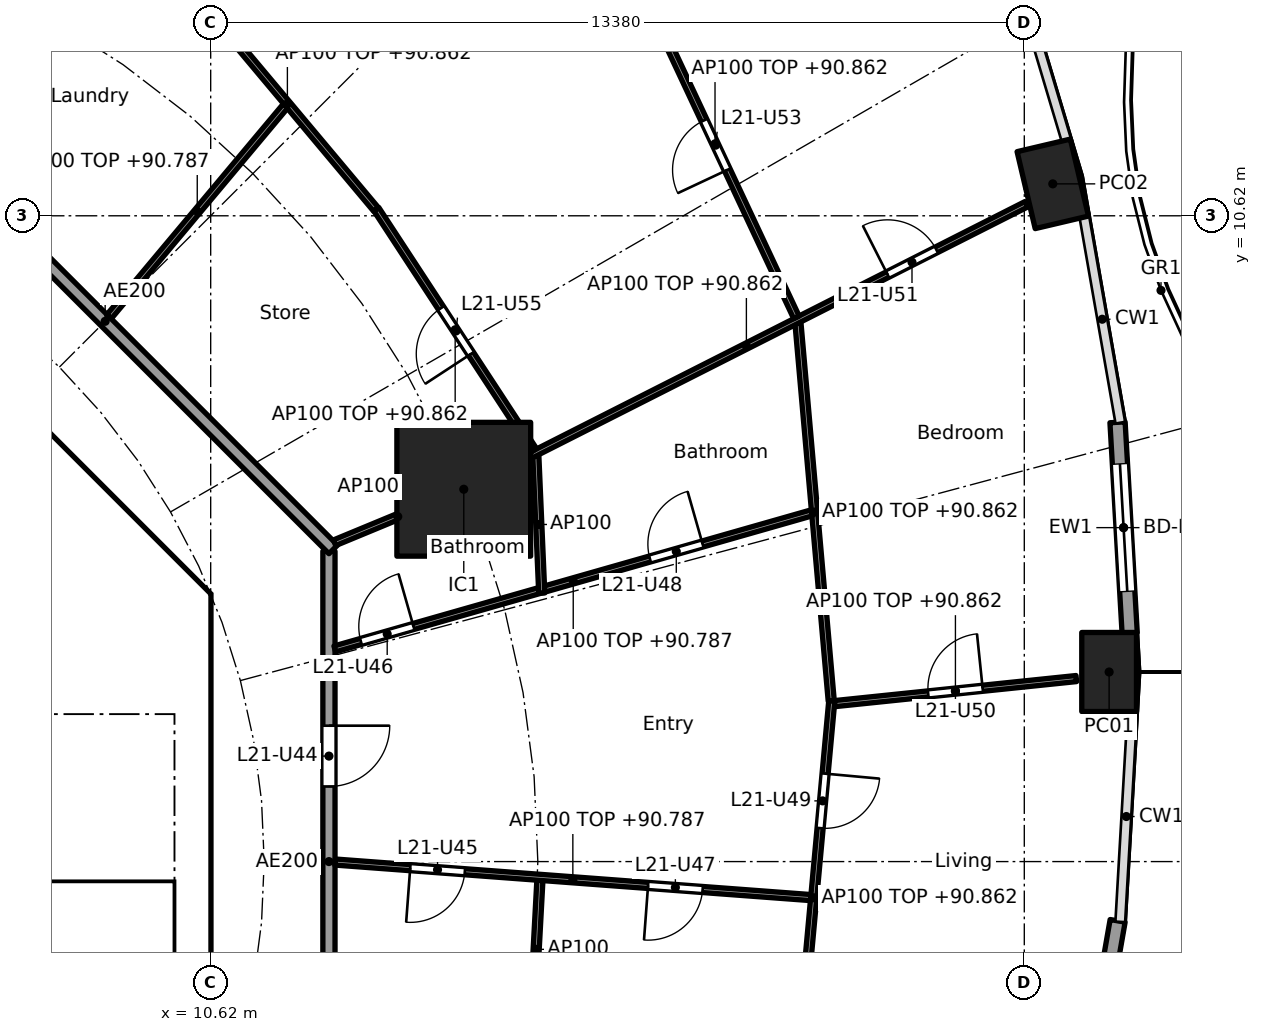
"""IFC4 building model, lengths in metres.
Left out: names, types, materials, properties, quantities, classifications, styles, units other than length and angle.
Written with IfcOpenShell. Run it as: python <this file> out.ifc"""

import sys

from ifc_helpers import new_model, si_unit, direction, frame, frame_2d, origin, origin_2d, place, context, subcontext, project, spatial, polyline, rectangle, hollow_rectangle, outline, extrude, element, fill, save


model = new_model("IFC4")
c1 = context("Model", 3, precision=1e-05, world=origin(), true_north=direction((0.0, 1.0)))
c2 = subcontext(c1, "Body", "Model", "MODEL_VIEW")
j1 = project(units=[si_unit("LENGTHUNIT", "METRE"), si_unit("PLANEANGLEUNIT", "RADIAN")], contexts=[c1])
p1 = place(None, origin())
s1 = spatial("IfcSite", under=j1, at=p1, CompositionType="ELEMENT")
p2 = place(p1, origin())
s2 = spatial("IfcBuilding", under=s1, at=p2, CompositionType="ELEMENT")
p3 = place(p2, frame((0.0, 0.0, 88.1)))
s3 = spatial("IfcBuildingStorey", under=s2, at=p3, CompositionType="ELEMENT", Elevation=88.1)
for number, where, z_axis, x_axis in (
    (1, (25.395, 3.118, 0.0), (0.0, 0.0, 1.0), (0.0, 1.0, 0.0)),
    (2, (24.468, 11.145, 0.0), (0.0, 0.0, 1.0), (-0.229, 0.973, 0.0)),
):
    element("IfcColumn", number, at=place(p3, frame(where, z_axis=z_axis, x_axis=x_axis)), inside=s3, PredefinedType="COLUMN", context=c2, shape_type="SweptSolid", body=[
        extrude(hollow_rectangle(XDim=1.3, YDim=0.9, WallThickness=0.045, at=origin_2d()), origin(), (0.0, 0.0, 1.0), 3.7),
    ])
p4 = place(p3, frame((14.782, 6.123, 0.0), z_axis=(0.0, 0.0, 1.0), x_axis=(1.0, 0.0, 0.0)))
e3 = element("IfcColumn", 3, at=p4, inside=s3, PredefinedType="COLUMN", context=c2, shape_type="SweptSolid", body=[
    extrude(rectangle(XDim=2.2, YDim=2.2, at=origin_2d()), origin(), (0.0, 0.0, 1.0), 3.7),
])
p5 = place(p3, frame((25.533, 7.224, 0.0), z_axis=(0.0, 0.0, 1.0), x_axis=(0.057546644052, -0.998342818754, 0.0)))
e4 = element("IfcWall", 4, at=p5, inside=s3, PredefinedType="SOLIDWALL", context=c2, shape_type="SweptSolid", body=[
    extrude(rectangle(XDim=3.47, YDim=0.25, at=frame_2d((1.735, 0.0))), origin(), (0.0, 0.0, 1.0), 3.44),
])
p6 = place(p5, frame((0.685, 0.0, 0.0)))
e5 = element("IfcOpeningElement", 5, at=p6, cuts=e4, PredefinedType="OPENING", context=c2, shape_type="SweptSolid", body=[
    extrude(rectangle(XDim=2.1, YDim=2.4, at=frame_2d((1.05, 1.2))), frame((0.0, 0.135, 0.0), z_axis=(0.0, -1.0, 0.0), x_axis=(1.0, 0.0, 0.0)), (0.0, 0.0, 1.0), 0.27),
])
p7 = place(p3, frame((25.535, -0.974, 0.0), z_axis=(0.0, 0.0, 1.0), x_axis=(-0.172164316671, -0.985068245385, 0.0)))
e6 = element("IfcWall", 6, at=p7, inside=s3, PredefinedType="SOLIDWALL", context=c2, shape_type="SweptSolid", body=[
    extrude(rectangle(XDim=3.454, YDim=0.25, at=frame_2d((1.727, 0.0))), origin(), (0.0, 0.0, 1.0), 3.44),
])
p8 = place(p7, frame((0.677, 0.0, 0.0)))
e7 = element("IfcOpeningElement", 7, at=p8, cuts=e6, PredefinedType="OPENING", context=c2, shape_type="SweptSolid", body=[
    extrude(rectangle(XDim=2.1, YDim=2.4, at=frame_2d((1.05, 1.2))), frame((0.0, 0.135, 0.0), z_axis=(0.0, -1.0, 0.0), x_axis=(1.0, 0.0, 0.0)), (0.0, 0.0, 1.0), 0.27),
])
p9 = place(p3, frame((9.988, 4.613, 0.0), z_axis=(0.0, 0.0, 1.0), x_axis=(-0.707106781187, 0.707106781187, 0.0)))
e8 = element("IfcWall", 8, at=p9, inside=s3, PredefinedType="SHEAR", context=c2, shape_type="SweptSolid", body=[
    extrude(rectangle(XDim=7.602, YDim=0.6, at=frame_2d((3.801, 0.0))), origin(), (0.0, 0.0, 1.0), 3.44),
])
p10 = place(p9, frame((3.201, 0.0, 0.0)))
e9 = element("IfcOpeningElement", 9, at=p10, cuts=e8, PredefinedType="OPENING", context=c2, shape_type="SweptSolid", body=[
    extrude(rectangle(XDim=1.2, YDim=2.1, at=frame_2d((0.6, 1.05))), frame((0.0, 0.31, 0.0), z_axis=(0.0, -1.0, 0.0), x_axis=(1.0, 0.0, 0.0)), (0.0, 0.0, 1.0), 0.62),
])
p11 = place(p3, frame((6.7, 4.0, 0.0), z_axis=(0.0, 0.0, 1.0), x_axis=(1.0, 0.0, 0.0)))
e10 = element("IfcWall", 10, at=p11, inside=s3, PredefinedType="SOLIDWALL", context=c2, shape_type="SweptSolid", body=[
    extrude(rectangle(XDim=3.325, YDim=0.2, at=frame_2d((1.662, 0.0))), origin(), (0.0, 0.0, 1.0), 3.44),
])
p12 = place(p11, frame((1.25, 0.0, 0.0)))
e11 = element("IfcOpeningElement", 11, at=p12, cuts=e10, PredefinedType="OPENING", context=c2, shape_type="SweptSolid", body=[
    extrude(rectangle(XDim=1.1, YDim=2.1, at=frame_2d((0.55, 1.05))), frame((0.0, 0.11, 0.0), z_axis=(0.0, -1.0, 0.0), x_axis=(1.0, 0.0, 0.0)), (0.0, 0.0, 1.0), 0.22),
])
p13 = place(p3, origin())
e12 = element("IfcWall", 12, at=p13, inside=s3, PredefinedType="SHEAR", context=c2, shape_type="SweptSolid", body=[
    extrude(outline(polyline([(9.776, -4.401), (10.025, -4.152), (10.025, -3.801), (10.025, 4.152), (9.776, 4.401), (10.2, 4.825), (10.625, 4.401), (10.625, -4.401), (10.2, -4.825), (9.776, -4.401)])), origin(), (0.0, 0.0, 1.0), 3.44),
])
p14 = place(p3, frame((12.565, -5.104, 0.0), z_axis=(0.0, 0.0, 1.0), x_axis=(0.0, 1.0, 0.0)))
e13 = element("IfcWall", 13, at=p14, inside=s3, PredefinedType="PARTITIONING", context=c2, shape_type="SweptSolid", body=[
    extrude(rectangle(XDim=10.209, YDim=0.2, at=frame_2d((5.104, 0.0))), origin(), (0.0, 0.0, 1.0), 3.44),
])
p15 = place(p14, frame((6.339, 0.0, 0.0)))
e14 = element("IfcOpeningElement", 14, at=p15, cuts=e13, PredefinedType="OPENING", context=c2, shape_type="SweptSolid", body=[
    extrude(rectangle(XDim=1.0, YDim=2.1, at=frame_2d((0.5, 1.05))), frame((0.0, 0.11, 0.0), z_axis=(0.0, -1.0, 0.0), x_axis=(1.0, 0.0, 0.0)), (0.0, 0.0, 1.0), 0.22),
])
p16 = place(p3, frame((12.635, 5.134, 0.0), z_axis=(0.0, 0.0, 1.0), x_axis=(-0.707106781187, 0.707106781187, 0.0)))
e15 = element("IfcWall", 15, at=p16, inside=s3, PredefinedType="PARTITIONING", context=c2, shape_type="SweptSolid", body=[
    extrude(rectangle(XDim=10.609, YDim=0.2, at=frame_2d((5.305, 0.0))), origin(), (0.0, 0.0, 1.0), 3.44),
])
p17 = place(p3, frame((20.879, 2.597, 0.0), z_axis=(0.0, 0.0, 1.0), x_axis=(0.994666546694, 0.103142914868, 0.0)))
e16 = element("IfcWall", 16, at=p17, inside=s3, PredefinedType="PARTITIONING", context=c2, shape_type="SweptSolid", body=[
    extrude(rectangle(XDim=3.998, YDim=0.1, at=frame_2d((1.999, 0.0))), origin(), (0.0, 0.0, 1.0), 2.762),
])
p18 = place(p17, frame((1.549, 0.0, 0.0)))
e17 = element("IfcOpeningElement", 17, at=p18, cuts=e16, PredefinedType="OPENING", context=c2, shape_type="SweptSolid", body=[
    extrude(rectangle(XDim=0.9, YDim=2.1, at=frame_2d((0.45, 1.05))), frame((0.0, 0.06, 0.0), z_axis=(0.0, -1.0, 0.0), x_axis=(1.0, 0.0, 0.0)), (0.0, 0.0, 1.0), 0.12),
])
p19 = place(p3, frame((20.825, 2.642, 0.0), z_axis=(0.0, 0.0, 1.0), x_axis=(-0.08776129045, 0.99614153407, 0.0)))
e18 = element("IfcWall", 18, at=p19, inside=s3, PredefinedType="PARTITIONING", context=c2, shape_type="SweptSolid", body=[
    extrude(rectangle(XDim=6.237, YDim=0.1, at=frame_2d((3.119, 0.0))), origin(), (0.0, 0.0, 1.0), 2.762),
])
p20 = place(p3, frame((20.834, 2.642, 0.0), z_axis=(0.0, 0.0, 1.0), x_axis=(-0.091385407685, -0.995815599025, 0.0)))
e19 = element("IfcWall", 19, at=p20, inside=s3, PredefinedType="PARTITIONING", context=c2, shape_type="SweptSolid", body=[
    extrude(rectangle(XDim=6.502, YDim=0.1, at=frame_2d((3.251, 0.0))), origin(), (0.0, 0.0, 1.0), 2.762),
])
p21 = place(p20, frame((1.201, 0.0, 0.0)))
e20 = element("IfcOpeningElement", 20, at=p21, cuts=e19, PredefinedType="OPENING", context=c2, shape_type="SweptSolid", body=[
    extrude(rectangle(XDim=0.9, YDim=2.1, at=frame_2d((0.45, 1.05))), frame((0.0, 0.06, 0.0), z_axis=(0.0, -1.0, 0.0), x_axis=(1.0, 0.0, 0.0)), (0.0, 0.0, 1.0), 0.12),
])
p22 = place(p3, frame((12.661, 3.497, 0.0), z_axis=(0.0, 0.0, 1.0), x_axis=(0.961626678623, 0.274361314621, 0.0)))
e21 = element("IfcWall", 21, at=p22, inside=s3, PredefinedType="PARTITIONING", context=c2, shape_type="SweptSolid", body=[
    extrude(rectangle(XDim=8.156, YDim=0.1, at=frame_2d((4.078, 0.0))), origin(), (0.0, 0.0, 1.0), 2.687),
])
p23 = place(p22, frame((0.446, 0.0, 0.0)))
e22 = element("IfcOpeningElement", 22, at=p23, cuts=e21, PredefinedType="OPENING", context=c2, shape_type="SweptSolid", body=[
    extrude(rectangle(XDim=0.9, YDim=2.1, at=frame_2d((0.45, 1.05))), frame((0.0, 0.06, 0.0), z_axis=(0.0, -1.0, 0.0), x_axis=(1.0, 0.0, 0.0)), (0.0, 0.0, 1.0), 0.12),
])
p24 = place(p22, frame((5.39, 0.0, 0.0)))
e23 = element("IfcOpeningElement", 23, at=p24, cuts=e21, PredefinedType="OPENING", context=c2, shape_type="SweptSolid", body=[
    extrude(rectangle(XDim=0.9, YDim=2.1, at=frame_2d((0.45, 1.05))), frame((0.0, 0.06, 0.0), z_axis=(0.0, -1.0, 0.0), x_axis=(1.0, 0.0, 0.0)), (0.0, 0.0, 1.0), 0.12),
])
p25 = place(p3, frame((16.064, 4.415, 0.0), z_axis=(0.0, 0.0, 1.0), x_axis=(-0.043118325477, 0.999069972528, 0.0)))
e24 = element("IfcWall", 24, at=p25, inside=s3, PredefinedType="PARTITIONING", context=c2, shape_type="SweptSolid", body=[
    extrude(rectangle(XDim=2.259, YDim=0.1, at=frame_2d((1.13, 0.0))), origin(), (0.0, 0.0, 1.0), 3.44),
])
p26 = place(p3, frame((12.657, 5.243, 0.0), z_axis=(0.0, 0.0, 1.0), x_axis=(0.923848837015, 0.382757529444, 0.0)))
e25 = element("IfcWall", 25, at=p26, inside=s3, PredefinedType="PARTITIONING", context=c2, shape_type="SweptSolid", body=[
    extrude(rectangle(XDim=2.25, YDim=0.1, at=frame_2d((1.125, 0.0))), origin(), (0.0, 0.0, 1.0), 3.44),
])
p27 = place(p3, frame((14.827, 6.146, 0.0), z_axis=(0.0, 0.0, 1.0), x_axis=(0.892068075337, 0.451901038906, 0.0)))
e26 = element("IfcWall", 26, at=p27, inside=s3, PredefinedType="PARTITIONING", context=c2, shape_type="SweptSolid", body=[
    extrude(rectangle(XDim=10.32, YDim=0.1, at=frame_2d((5.16, 0.0))), origin(), (0.0, 0.0, 1.0), 2.762),
])
p28 = place(p27, frame((7.763, 0.0, 0.0)))
e27 = element("IfcOpeningElement", 27, at=p28, cuts=e26, PredefinedType="OPENING", context=c2, shape_type="SweptSolid", body=[
    extrude(rectangle(XDim=0.9, YDim=2.1, at=frame_2d((0.45, 1.05))), frame((0.0, 0.06, 0.0), z_axis=(0.0, -1.0, 0.0), x_axis=(1.0, 0.0, 0.0)), (0.0, 0.0, 1.0), 0.12),
])
p29 = place(p3, frame((15.938, 6.764, 0.0), z_axis=(0.0, 0.0, 1.0), x_axis=(-0.547472878942, 0.836823426311, 0.0)))
e28 = element("IfcWall", 28, at=p29, inside=s3, PredefinedType="PARTITIONING", context=c2, shape_type="SweptSolid", body=[
    extrude(rectangle(XDim=4.738, YDim=0.1, at=frame_2d((2.369, 0.0))), origin(), (0.0, 0.0, 1.0), 2.762),
])
p30 = place(p29, frame((1.894, 0.0, 0.0)))
e29 = element("IfcOpeningElement", 29, at=p30, cuts=e28, PredefinedType="OPENING", context=c2, shape_type="SweptSolid", body=[
    extrude(rectangle(XDim=0.9, YDim=2.1, at=frame_2d((0.45, 1.05))), frame((0.0, 0.06, 0.0), z_axis=(0.0, -1.0, 0.0), x_axis=(1.0, 0.0, 0.0)), (0.0, 0.0, 1.0), 0.12),
])
p31 = place(p3, frame((20.252, 8.95, 0.0), z_axis=(0.0, 0.0, 1.0), x_axis=(-0.424580709335, 0.905390093419, 0.0)))
e30 = element("IfcWall", 30, at=p31, inside=s3, PredefinedType="PARTITIONING", context=c2, shape_type="SweptSolid", body=[
    extrude(rectangle(XDim=6.304, YDim=0.1, at=frame_2d((3.152, 0.0))), origin(), (0.0, 0.0, 1.0), 2.762),
])
p32 = place(p31, frame((2.677, 0.0, 0.0)))
e31 = element("IfcOpeningElement", 31, at=p32, cuts=e30, PredefinedType="OPENING", context=c2, shape_type="SweptSolid", body=[
    extrude(rectangle(XDim=0.9, YDim=2.1, at=frame_2d((0.45, 1.05))), frame((0.0, 0.06, 0.0), z_axis=(0.0, -1.0, 0.0), x_axis=(1.0, 0.0, 0.0)), (0.0, 0.0, 1.0), 0.12),
])
p33 = place(p3, frame((13.339, 10.725, 0.0), z_axis=(0.0, 0.0, 1.0), x_axis=(-0.642515455924, 0.766272724882, 0.0)))
e32 = element("IfcWall", 32, at=p33, inside=s3, PredefinedType="PARTITIONING", context=c2, shape_type="SweptSolid", body=[
    extrude(rectangle(XDim=4.537, YDim=0.1, at=frame_2d((2.269, 0.0))), origin(), (0.0, 0.0, 1.0), 2.762),
])
p34 = place(p3, frame((8.949, 8.961, 0.0), z_axis=(0.0, 0.0, 1.0), x_axis=(0.642048217601, 0.766664259162, 0.0)))
e33 = element("IfcWall", 33, at=p34, inside=s3, PredefinedType="PARTITIONING", context=c2, shape_type="SweptSolid", body=[
    extrude(rectangle(XDim=4.518, YDim=0.1, at=frame_2d((2.259, 0.0))), origin(), (0.0, 0.0, 1.0), 2.687),
])
p35 = place(p3, frame((15.912, -2.577, 0.0), z_axis=(0.0, 0.0, 1.0), x_axis=(0.053749298185, 0.998554461682, 0.0)))
e34 = element("IfcWall", 34, at=p35, inside=s3, PredefinedType="PARTITIONING", context=c2, shape_type="SweptSolid", body=[
    extrude(rectangle(XDim=2.271, YDim=0.1, at=frame_2d((1.135, 0.0))), origin(), (0.0, 0.0, 1.0), 3.44),
])
p36 = place(p3, frame((12.665, -0.008, 0.0), z_axis=(0.0, 0.0, 1.0), x_axis=(0.997222647159, -0.074478130978, 0.0)))
e35 = element("IfcWall", 35, at=p36, inside=s3, PredefinedType="PARTITIONING", context=c2, shape_type="SweptSolid", body=[
    extrude(rectangle(XDim=7.844, YDim=0.1, at=frame_2d((3.922, 0.0))), origin(), (0.0, 0.0, 1.0), 2.687),
])
p37 = place(p36, frame((1.241, 0.0, 0.0)))
e36 = element("IfcOpeningElement", 36, at=p37, cuts=e35, PredefinedType="OPENING", context=c2, shape_type="SweptSolid", body=[
    extrude(rectangle(XDim=0.9, YDim=2.1, at=frame_2d((0.45, 1.05))), frame((0.0, 0.06, 0.0), z_axis=(0.0, -1.0, 0.0), x_axis=(1.0, 0.0, 0.0)), (0.0, 0.0, 1.0), 0.12),
])
p38 = place(p36, frame((5.163, 0.0, 0.0)))
e37 = element("IfcOpeningElement", 37, at=p38, cuts=e35, PredefinedType="OPENING", context=c2, shape_type="SweptSolid", body=[
    extrude(rectangle(XDim=0.9, YDim=2.1, at=frame_2d((0.45, 1.05))), frame((0.0, 0.06, 0.0), z_axis=(0.0, -1.0, 0.0), x_axis=(1.0, 0.0, 0.0)), (0.0, 0.0, 1.0), 0.12),
])
p39 = place(p6, origin())
e38 = element("IfcDoor", 38, at=p39, inside=s3, OperationType="SLIDING_TO_LEFT", PredefinedType="DOOR", context=c2, shape_type="SweptSolid", body=[
    extrude(rectangle(XDim=2.1, YDim=2.4, at=frame_2d((1.05, 1.2))), frame((0.0, 0.025, 0.0), z_axis=(0.0, -1.0, 0.0), x_axis=(1.0, 0.0, 0.0)), (0.0, 0.0, 1.0), 0.05),
])
fill(e5, e38)
p40 = place(p12, frame((1.1, 0.0, 0.0), x_axis=(-1.0, 0.0, 0.0)))
e39 = element("IfcDoor", 39, at=p40, inside=s3, OperationType="SINGLE_SWING_RIGHT", PredefinedType="DOOR", context=c2, shape_type="SweptSolid", body=[
    extrude(rectangle(XDim=1.1, YDim=2.1, at=frame_2d((0.55, 1.05))), frame((0.0, 0.025, 0.0), z_axis=(0.0, -1.0, 0.0), x_axis=(1.0, 0.0, 0.0)), (0.0, 0.0, 1.0), 0.05),
])
fill(e11, e39)
p41 = place(p15, frame((1.0, 0.0, 0.0), x_axis=(-1.0, 0.0, 0.0)))
e40 = element("IfcDoor", 40, at=p41, inside=s3, OperationType="SINGLE_SWING_LEFT", PredefinedType="DOOR", context=c2, shape_type="SweptSolid", body=[
    extrude(rectangle(XDim=1.0, YDim=2.1, at=frame_2d((0.5, 1.05))), frame((0.0, 0.025, 0.0), z_axis=(0.0, -1.0, 0.0), x_axis=(1.0, 0.0, 0.0)), (0.0, 0.0, 1.0), 0.05),
])
fill(e14, e40)
p42 = place(p37, frame((0.9, 0.0, 0.0), x_axis=(-1.0, 0.0, 0.0)))
e41 = element("IfcDoor", 41, at=p42, inside=s3, OperationType="SINGLE_SWING_RIGHT", PredefinedType="DOOR", context=c2, shape_type="SweptSolid", body=[
    extrude(rectangle(XDim=0.9, YDim=2.1, at=frame_2d((0.45, 1.05))), frame((0.0, 0.025, 0.0), z_axis=(0.0, -1.0, 0.0), x_axis=(1.0, 0.0, 0.0)), (0.0, 0.0, 1.0), 0.05),
])
fill(e36, e41)
p43 = place(p23, origin())
e42 = element("IfcDoor", 42, at=p43, inside=s3, OperationType="SINGLE_SWING_RIGHT", PredefinedType="DOOR", context=c2, shape_type="SweptSolid", body=[
    extrude(rectangle(XDim=0.9, YDim=2.1, at=frame_2d((0.45, 1.05))), frame((0.0, 0.025, 0.0), z_axis=(0.0, -1.0, 0.0), x_axis=(1.0, 0.0, 0.0)), (0.0, 0.0, 1.0), 0.05),
])
fill(e22, e42)
p44 = place(p38, frame((0.9, 0.0, 0.0), x_axis=(-1.0, 0.0, 0.0)))
e43 = element("IfcDoor", 43, at=p44, inside=s3, OperationType="SINGLE_SWING_RIGHT", PredefinedType="DOOR", context=c2, shape_type="SweptSolid", body=[
    extrude(rectangle(XDim=0.9, YDim=2.1, at=frame_2d((0.45, 1.05))), frame((0.0, 0.025, 0.0), z_axis=(0.0, -1.0, 0.0), x_axis=(1.0, 0.0, 0.0)), (0.0, 0.0, 1.0), 0.05),
])
fill(e37, e43)
p45 = place(p24, origin())
e44 = element("IfcDoor", 44, at=p45, inside=s3, OperationType="SINGLE_SWING_RIGHT", PredefinedType="DOOR", context=c2, shape_type="SweptSolid", body=[
    extrude(rectangle(XDim=0.9, YDim=2.1, at=frame_2d((0.45, 1.05))), frame((0.0, 0.025, 0.0), z_axis=(0.0, -1.0, 0.0), x_axis=(1.0, 0.0, 0.0)), (0.0, 0.0, 1.0), 0.05),
])
fill(e23, e44)
p46 = place(p21, origin())
e45 = element("IfcDoor", 45, at=p46, inside=s3, OperationType="SINGLE_SWING_LEFT", PredefinedType="DOOR", context=c2, shape_type="SweptSolid", body=[
    extrude(rectangle(XDim=0.9, YDim=2.1, at=frame_2d((0.45, 1.05))), frame((0.0, 0.025, 0.0), z_axis=(0.0, -1.0, 0.0), x_axis=(1.0, 0.0, 0.0)), (0.0, 0.0, 1.0), 0.05),
])
fill(e20, e45)
p47 = place(p18, origin())
e46 = element("IfcDoor", 46, at=p47, inside=s3, OperationType="SINGLE_SWING_RIGHT", PredefinedType="DOOR", context=c2, shape_type="SweptSolid", body=[
    extrude(rectangle(XDim=0.9, YDim=2.1, at=frame_2d((0.45, 1.05))), frame((0.0, 0.025, 0.0), z_axis=(0.0, -1.0, 0.0), x_axis=(1.0, 0.0, 0.0)), (0.0, 0.0, 1.0), 0.05),
])
fill(e17, e46)
p48 = place(p28, origin())
e47 = element("IfcDoor", 47, at=p48, inside=s3, OperationType="SINGLE_SWING_LEFT", PredefinedType="DOOR", context=c2, shape_type="SweptSolid", body=[
    extrude(rectangle(XDim=0.9, YDim=2.1, at=frame_2d((0.45, 1.05))), frame((0.0, 0.025, 0.0), z_axis=(0.0, -1.0, 0.0), x_axis=(1.0, 0.0, 0.0)), (0.0, 0.0, 1.0), 0.05),
])
fill(e27, e47)
p49 = place(p32, origin())
e48 = element("IfcDoor", 48, at=p49, inside=s3, OperationType="SINGLE_SWING_LEFT", PredefinedType="DOOR", context=c2, shape_type="SweptSolid", body=[
    extrude(rectangle(XDim=0.9, YDim=2.1, at=frame_2d((0.45, 1.05))), frame((0.0, 0.025, 0.0), z_axis=(0.0, -1.0, 0.0), x_axis=(1.0, 0.0, 0.0)), (0.0, 0.0, 1.0), 0.05),
])
fill(e31, e48)
p50 = place(p30, origin())
e49 = element("IfcDoor", 49, at=p50, inside=s3, OperationType="SINGLE_SWING_LEFT", PredefinedType="DOOR", context=c2, shape_type="SweptSolid", body=[
    extrude(rectangle(XDim=0.9, YDim=2.1, at=frame_2d((0.45, 1.05))), frame((0.0, 0.025, 0.0), z_axis=(0.0, -1.0, 0.0), x_axis=(1.0, 0.0, 0.0)), (0.0, 0.0, 1.0), 0.05),
])
fill(e29, e49)
save(model, sys.argv[1])
